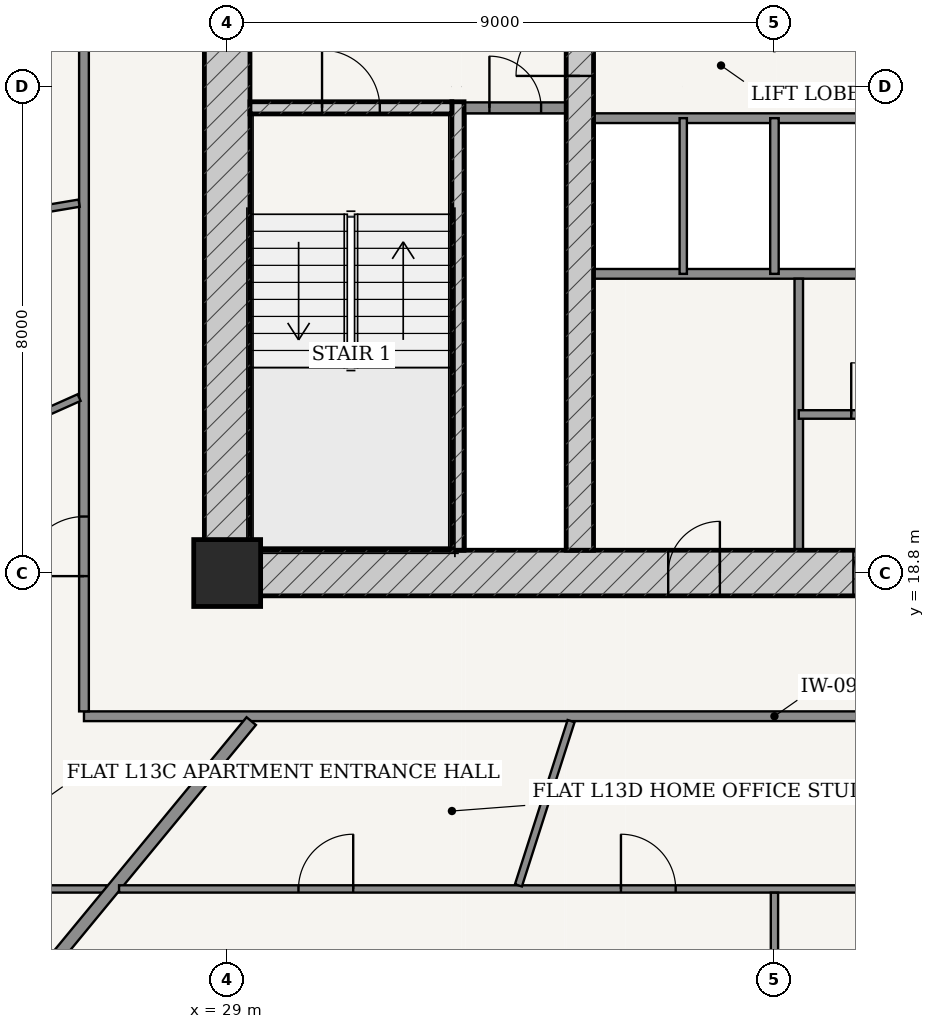
"""IFC4 building model, lengths in metres.
Left out: names, types, materials, properties, quantities, classifications, styles, units other than length and angle.
Written with IfcOpenShell. Run it as: python <this file> out.ifc"""

import sys

from ifc_helpers import new_model, si_unit, direction, frame, frame_2d, origin, origin_2d, place, context, subcontext, project, spatial, rectangle, extrude, source, transform, mapped, element, fill, save


model = new_model("IFC4")
c1 = context("Model", 3, precision=1e-05, world=origin(), true_north=direction((-0.2419218956, 0.970295726276)))
c2 = subcontext(c1, "Body", "Model", "MODEL_VIEW")
j1 = project(units=[si_unit("LENGTHUNIT", "METRE"), si_unit("PLANEANGLEUNIT", "RADIAN")], contexts=[c1])
p1 = place(None, origin())
s1 = spatial("IfcSite", under=j1, at=p1, CompositionType="ELEMENT")
p2 = place(p1, origin())
s2 = spatial("IfcBuilding", under=s1, at=p2, CompositionType="ELEMENT")
p3 = place(p2, frame((0.0, 0.0, 52.8)))
s3 = spatial("IfcBuildingStorey", under=s2, at=p3, CompositionType="ELEMENT", Elevation=52.8)
p4 = place(p3, frame((29.0, 18.8, 0.0), z_axis=(0.0, 0.0, 1.0), x_axis=(1.0, 0.0, 0.0)))
e1 = element("IfcColumn", 1, at=p4, inside=s3, PredefinedType="COLUMN", context=c2, shape_type="SweptSolid", body=[
    extrude(rectangle(XDim=1.1, YDim=1.1, at=origin_2d()), origin(), (0.0, 0.0, 1.0), 3.6),
])
p5 = place(p3, frame((28.625, 18.8, 0.0), z_axis=(0.0, 0.0, 1.0), x_axis=(1.0, 0.0, 0.0)))
e2 = element("IfcWall", 2, at=p5, inside=s3, PredefinedType="SHEAR", context=c2, shape_type="SweptSolid", body=[
    extrude(rectangle(XDim=18.75, YDim=0.75, at=frame_2d((9.375, 0.0))), origin(), (0.0, 0.0, 1.0), 3.32),
])
p6 = place(p5, frame((7.627, 0.0, 0.0)))
e3 = element("IfcOpeningElement", 3, at=p6, cuts=e2, PredefinedType="OPENING", context=c2, shape_type="SweptSolid", body=[
    extrude(rectangle(XDim=0.85, YDim=2.1, at=frame_2d((0.425, 1.05))), frame((0.0, 0.385, 0.0), z_axis=(0.0, -1.0, 0.0), x_axis=(1.0, 0.0, 0.0)), (0.0, 0.0, 1.0), 0.77),
])
p7 = place(p5, frame((10.673, 0.0, 0.0)))
e4 = element("IfcOpeningElement", 4, at=p7, cuts=e2, PredefinedType="OPENING", context=c2, shape_type="SweptSolid", body=[
    extrude(rectangle(XDim=0.85, YDim=2.1, at=frame_2d((0.425, 1.05))), frame((0.0, 0.385, 0.0), z_axis=(0.0, -1.0, 0.0), x_axis=(1.0, 0.0, 0.0)), (0.0, 0.0, 1.0), 0.77),
])
p8 = place(p3, frame((29.0, 19.175, 0.0), z_axis=(0.0, 0.0, 1.0), x_axis=(0.0, 1.0, 0.0)))
e5 = element("IfcWall", 5, at=p8, inside=s3, PredefinedType="SHEAR", context=c2, shape_type="SweptSolid", body=[
    extrude(rectangle(XDim=15.25, YDim=0.75, at=frame_2d((7.625, 0.0))), origin(), (0.0, 0.0, 1.0), 3.32),
])
p9 = place(p8, frame((9.875, 0.0, 0.0)))
e6 = element("IfcOpeningElement", 6, at=p9, cuts=e5, PredefinedType="OPENING", context=c2, shape_type="SweptSolid", body=[
    extrude(rectangle(XDim=1.5, YDim=2.2, at=frame_2d((0.75, 1.1))), frame((0.0, 0.385, 0.0), z_axis=(0.0, -1.0, 0.0), x_axis=(1.0, 0.0, 0.0)), (0.0, 0.0, 1.0), 0.77),
])
p10 = place(p3, frame((32.795, 19.175, 0.0), z_axis=(0.0, 0.0, 1.0), x_axis=(0.0, 1.0, 0.0)))
e7 = element("IfcWall", 7, at=p10, inside=s3, PredefinedType="SOLIDWALL", context=c2, shape_type="SweptSolid", body=[
    extrude(rectangle(XDim=7.375, YDim=0.2, at=frame_2d((3.688, 0.0))), origin(), (0.0, 0.0, 1.0), 3.32),
])
p11 = place(p3, frame((29.375, 26.45, 0.0), z_axis=(0.0, 0.0, 1.0), x_axis=(1.0, 0.0, 0.0)))
e8 = element("IfcWall", 8, at=p11, inside=s3, PredefinedType="SOLIDWALL", context=c2, shape_type="SweptSolid", body=[
    extrude(rectangle(XDim=3.32, YDim=0.2, at=frame_2d((1.66, 0.0))), origin(), (0.0, 0.0, 1.0), 3.32),
])
p12 = place(p11, frame((1.185, 0.0, 0.0)))
e9 = element("IfcOpeningElement", 9, at=p12, cuts=e8, PredefinedType="OPENING", context=c2, shape_type="SweptSolid", body=[
    extrude(rectangle(XDim=0.95, YDim=2.15, at=frame_2d((0.475, 1.075))), frame((0.0, 0.11, 0.0), z_axis=(0.0, -1.0, 0.0), x_axis=(1.0, 0.0, 0.0)), (0.0, 0.0, 1.0), 0.22),
])
p13 = place(p3, frame((34.8, 19.175, 0.0), z_axis=(0.0, 0.0, 1.0), x_axis=(0.0, 1.0, 0.0)))
e10 = element("IfcWall", 10, at=p13, inside=s3, PredefinedType="SHEAR", context=c2, shape_type="SweptSolid", body=[
    extrude(rectangle(XDim=15.25, YDim=0.45, at=frame_2d((7.625, 0.0))), origin(), (0.0, 0.0, 1.0), 3.32),
])
p14 = place(p13, frame((7.8, 0.0, 0.0)))
e11 = element("IfcOpeningElement", 11, at=p14, cuts=e10, PredefinedType="OPENING", context=c2, shape_type="SweptSolid", body=[
    extrude(rectangle(XDim=1.05, YDim=2.15, at=frame_2d((0.525, 1.075))), frame((0.0, 0.235, 0.0), z_axis=(0.0, -1.0, 0.0), x_axis=(1.0, 0.0, 0.0)), (0.0, 0.0, 1.0), 0.47),
])
p15 = place(p3, frame((32.9, 26.45, 0.0), z_axis=(0.0, 0.0, 1.0), x_axis=(1.0, 0.0, 0.0)))
e12 = element("IfcWall", 12, at=p15, inside=s3, PredefinedType="PARTITIONING", context=c2, shape_type="SweptSolid", body=[
    extrude(rectangle(XDim=1.675, YDim=0.18, at=frame_2d((0.837, 0.0))), origin(), (0.0, 0.0, 1.0), 3.32),
])
p16 = place(p15, frame((0.413, 0.0, 0.0)))
e13 = element("IfcOpeningElement", 13, at=p16, cuts=e12, PredefinedType="OPENING", context=c2, shape_type="SweptSolid", body=[
    extrude(rectangle(XDim=0.85, YDim=2.1, at=frame_2d((0.425, 1.05))), frame((0.0, 0.1, 0.0), z_axis=(0.0, -1.0, 0.0), x_axis=(1.0, 0.0, 0.0)), (0.0, 0.0, 1.0), 0.2),
])
for number, where, z_axis, x_axis in (
    (14, (35.025, 26.28, 0.0), (0.0, 0.0, 1.0), (1.0, 0.0, 0.0)),
    (15, (35.025, 23.72, 0.0), (0.0, 0.0, 1.0), (1.0, 0.0, 0.0)),
):
    element("IfcWall", number, at=place(p3, frame(where, z_axis=z_axis, x_axis=x_axis)), inside=s3, PredefinedType="PARTITIONING", context=c2, shape_type="SweptSolid", body=[
        extrude(rectangle(XDim=5.95, YDim=0.16, at=frame_2d((2.975, 0.0))), origin(), (0.0, 0.0, 1.0), 3.32),
    ])
p17 = place(p3, frame((36.5, 23.72, 0.0), z_axis=(0.0, 0.0, 1.0), x_axis=(0.0, 1.0, 0.0)))
e16 = element("IfcWall", 16, at=p17, inside=s3, PredefinedType="PARTITIONING", context=c2, shape_type="SweptSolid", body=[
    extrude(rectangle(XDim=2.56, YDim=0.12, at=frame_2d((1.28, 0.0))), origin(), (0.0, 0.0, 1.0), 3.32),
])
p18 = place(p3, frame((38.0, 23.72, 0.0), z_axis=(0.0, 0.0, 1.0), x_axis=(0.0, 1.0, 0.0)))
e17 = element("IfcWall", 17, at=p18, inside=s3, PredefinedType="PARTITIONING", context=c2, shape_type="SweptSolid", body=[
    extrude(rectangle(XDim=2.56, YDim=0.14, at=frame_2d((1.28, 0.0))), origin(), (0.0, 0.0, 1.0), 3.32),
])
p19 = place(p3, frame((38.4, 19.175, 0.0), z_axis=(0.0, 0.0, 1.0), x_axis=(0.0, 1.0, 0.0)))
e18 = element("IfcWall", 18, at=p19, inside=s3, PredefinedType="PARTITIONING", context=c2, shape_type="SweptSolid", body=[
    extrude(rectangle(XDim=4.465, YDim=0.14, at=frame_2d((2.232, 0.0))), origin(), (0.0, 0.0, 1.0), 3.32),
])
p20 = place(p3, frame((38.4, 21.407, 0.0), z_axis=(0.0, 0.0, 1.0), x_axis=(1.0, 0.0, 0.0)))
e19 = element("IfcWall", 19, at=p20, inside=s3, PredefinedType="PARTITIONING", context=c2, shape_type="SweptSolid", body=[
    extrude(rectangle(XDim=2.575, YDim=0.14, at=frame_2d((1.288, 0.0))), origin(), (0.0, 0.0, 1.0), 3.32),
])
p21 = place(p20, frame((0.863, 0.0, 0.0)))
e20 = element("IfcOpeningElement", 20, at=p21, cuts=e19, PredefinedType="OPENING", context=c2, shape_type="SweptSolid", body=[
    extrude(rectangle(XDim=0.85, YDim=2.1, at=frame_2d((0.425, 1.05))), frame((0.0, 0.08, 0.0), z_axis=(0.0, -1.0, 0.0), x_axis=(1.0, 0.0, 0.0)), (0.0, 0.0, 1.0), 0.16),
])
p22 = place(p3, frame((26.645, 16.445, 0.0), z_axis=(0.0, 0.0, 1.0), x_axis=(1.0, 0.0, 0.0)))
e21 = element("IfcWall", 21, at=p22, inside=s3, PredefinedType="PARTITIONING", context=c2, shape_type="SweptSolid", body=[
    extrude(rectangle(XDim=22.71, YDim=0.16, at=frame_2d((11.355, 0.0))), origin(), (0.0, 0.0, 1.0), 2.688),
])
p23 = place(p22, frame((19.962, 0.0, 0.0)))
e22 = element("IfcOpeningElement", 22, at=p23, cuts=e21, PredefinedType="OPENING", context=c2, shape_type="SweptSolid", body=[
    extrude(rectangle(XDim=0.98, YDim=2.2, at=frame_2d((0.49, 1.1))), frame((0.0, 0.09, 0.0), z_axis=(0.0, -1.0, 0.0), x_axis=(1.0, 0.0, 0.0)), (0.0, 0.0, 1.0), 0.18),
])
p24 = place(p3, frame((26.645, 16.525, 0.0), z_axis=(0.0, 0.0, 1.0), x_axis=(0.0, 1.0, 0.0)))
e23 = element("IfcWall", 23, at=p24, inside=s3, PredefinedType="PARTITIONING", context=c2, shape_type="SweptSolid", body=[
    extrude(rectangle(XDim=20.55, YDim=0.16, at=frame_2d((10.275, 0.0))), origin(), (0.0, 0.0, 1.0), 2.688),
])
p25 = place(p24, frame((2.224, 0.0, 0.0)))
e24 = element("IfcOpeningElement", 24, at=p25, cuts=e23, PredefinedType="OPENING", context=c2, shape_type="SweptSolid", body=[
    extrude(rectangle(XDim=0.98, YDim=2.2, at=frame_2d((0.49, 1.1))), frame((0.0, 0.09, 0.0), z_axis=(0.0, -1.0, 0.0), x_axis=(1.0, 0.0, 0.0)), (0.0, 0.0, 1.0), 0.18),
])
p26 = place(p3, frame((27.018, 13.605, 0.0), z_axis=(0.0, 0.0, 1.0), x_axis=(-1.0, 0.0, 0.0)))
e25 = element("IfcWall", 25, at=p26, inside=s3, PredefinedType="PARTITIONING", context=c2, shape_type="SweptSolid", body=[
    extrude(rectangle(XDim=3.213, YDim=0.12, at=frame_2d((1.606, 0.0))), origin(), (0.0, 0.0, 1.0), 2.688),
])
p27 = place(p3, frame((26.565, 24.883, 0.0), z_axis=(0.0, 0.0, 1.0), x_axis=(-0.986224611599, -0.165411654596, 0.0)))
e26 = element("IfcWall", 26, at=p27, inside=s3, PredefinedType="PARTITIONING", context=c2, shape_type="SweptSolid", body=[
    extrude(rectangle(XDim=2.736, YDim=0.12, at=frame_2d((1.368, 0.0))), origin(), (0.0, 0.0, 1.0), 2.688),
])
p28 = place(p3, frame((26.565, 21.685, 0.0), z_axis=(0.0, 0.0, 1.0), x_axis=(-0.912840085104, -0.408317252914, 0.0)))
e27 = element("IfcWall", 27, at=p28, inside=s3, PredefinedType="PARTITIONING", context=c2, shape_type="SweptSolid", body=[
    extrude(rectangle(XDim=2.961, YDim=0.12, at=frame_2d((1.481, 0.0))), origin(), (0.0, 0.0, 1.0), 3.32),
])
p29 = place(p28, frame((1.051, 0.0, 0.0)))
e28 = element("IfcOpeningElement", 28, at=p29, cuts=e27, PredefinedType="OPENING", context=c2, shape_type="SweptSolid", body=[
    extrude(rectangle(XDim=0.86, YDim=2.15, at=frame_2d((0.43, 1.075))), frame((0.0, 0.07, 0.0), z_axis=(0.0, -1.0, 0.0), x_axis=(1.0, 0.0, 0.0)), (0.0, 0.0, 1.0), 0.14),
])
p30 = place(p3, frame((29.396, 16.365, 0.0), z_axis=(0.0, 0.0, 1.0), x_axis=(-0.636186165667, -0.771535587393, 0.0)))
e29 = element("IfcWall", 29, at=p30, inside=s3, PredefinedType="PARTITIONING", context=c2, shape_type="SweptSolid", body=[
    extrude(rectangle(XDim=11.683, YDim=0.2, at=frame_2d((5.842, 0.0))), origin(), (0.0, 0.0, 1.0), 2.688),
])
p31 = place(p3, frame((52.195, 13.605, 0.0), z_axis=(0.0, 0.0, 1.0), x_axis=(-1.0, 0.0, 0.0)))
e30 = element("IfcWall", 30, at=p31, inside=s3, PredefinedType="PARTITIONING", context=c2, shape_type="SweptSolid", body=[
    extrude(rectangle(XDim=24.973, YDim=0.12, at=frame_2d((12.487, 0.0))), origin(), (0.0, 0.0, 1.0), 2.688),
])
p32 = place(p31, frame((3.841, 0.0, 0.0)))
e31 = element("IfcOpeningElement", 31, at=p32, cuts=e30, PredefinedType="OPENING", context=c2, shape_type="SweptSolid", body=[
    extrude(rectangle(XDim=0.9, YDim=2.15, at=frame_2d((0.45, 1.075))), frame((0.0, 0.07, 0.0), z_axis=(0.0, -1.0, 0.0), x_axis=(1.0, 0.0, 0.0)), (0.0, 0.0, 1.0), 0.14),
])
p33 = place(p31, frame((15.819, 0.0, 0.0)))
e32 = element("IfcOpeningElement", 32, at=p33, cuts=e30, PredefinedType="OPENING", context=c2, shape_type="SweptSolid", body=[
    extrude(rectangle(XDim=0.9, YDim=2.15, at=frame_2d((0.45, 1.075))), frame((0.0, 0.07, 0.0), z_axis=(0.0, -1.0, 0.0), x_axis=(1.0, 0.0, 0.0)), (0.0, 0.0, 1.0), 0.14),
])
p34 = place(p31, frame((21.123, 0.0, 0.0)))
e33 = element("IfcOpeningElement", 33, at=p34, cuts=e30, PredefinedType="OPENING", context=c2, shape_type="SweptSolid", body=[
    extrude(rectangle(XDim=0.9, YDim=2.15, at=frame_2d((0.45, 1.075))), frame((0.0, 0.07, 0.0), z_axis=(0.0, -1.0, 0.0), x_axis=(1.0, 0.0, 0.0)), (0.0, 0.0, 1.0), 0.14),
])
p35 = place(p3, frame((38.0, 13.543, 0.0), z_axis=(0.0, 0.0, 1.0), x_axis=(0.0, -1.0, 0.0)))
e34 = element("IfcWall", 34, at=p35, inside=s3, PredefinedType="PARTITIONING", context=c2, shape_type="SweptSolid", body=[
    extrude(rectangle(XDim=10.183, YDim=0.12, at=frame_2d((5.091, 0.0))), origin(), (0.0, 0.0, 1.0), 2.762),
])
p36 = place(p35, frame((4.642, 0.0, 0.0)))
e35 = element("IfcOpeningElement", 35, at=p36, cuts=e34, PredefinedType="OPENING", context=c2, shape_type="SweptSolid", body=[
    extrude(rectangle(XDim=0.9, YDim=2.15, at=frame_2d((0.45, 1.075))), frame((0.0, 0.07, 0.0), z_axis=(0.0, -1.0, 0.0), x_axis=(1.0, 0.0, 0.0)), (0.0, 0.0, 1.0), 0.14),
])
p37 = place(p3, frame((34.656, 16.365, 0.0), z_axis=(0.0, 0.0, 1.0), x_axis=(-0.305153630579, -0.952303135427, 0.0)))
e36 = element("IfcWall", 36, at=p37, inside=s3, PredefinedType="PARTITIONING", context=c2, shape_type="SweptSolid", body=[
    extrude(rectangle(XDim=2.836, YDim=0.12, at=frame_2d((1.418, 0.0))), origin(), (0.0, 0.0, 1.0), 3.32),
])
m1 = source(origin(), c2, "Body", "SweptSolid", [
    extrude(rectangle(XDim=1.05, YDim=2.15, at=frame_2d((0.525, 1.075))), frame((0.0, 0.025, 0.0), z_axis=(0.0, -1.0, 0.0), x_axis=(1.0, 0.0, 0.0)), (0.0, 0.0, 1.0), 0.05),
])
p38 = place(p14, origin())
e37 = element("IfcDoor", 37, at=p38, inside=s3, OperationType="SINGLE_SWING_LEFT", PredefinedType="DOOR", context=c2, shape_type="MappedRepresentation", body=[
    mapped(m1, transform((0.0, 0.0, 0.0), scale=1.0)),
])
fill(e11, e37)
m2 = source(origin(), c2, "Body", "SweptSolid", [
    extrude(rectangle(XDim=0.95, YDim=2.15, at=frame_2d((0.475, 1.075))), frame((0.0, 0.025, 0.0), z_axis=(0.0, -1.0, 0.0), x_axis=(1.0, 0.0, 0.0)), (0.0, 0.0, 1.0), 0.05),
])
p39 = place(p12, origin())
e38 = element("IfcDoor", 38, at=p39, inside=s3, OperationType="SINGLE_SWING_LEFT", PredefinedType="DOOR", context=c2, shape_type="MappedRepresentation", body=[
    mapped(m2, transform((0.0, 0.0, 0.0), scale=1.0)),
])
fill(e9, e38)
m3 = source(origin(), c2, "Body", "SweptSolid", [
    extrude(rectangle(XDim=0.85, YDim=2.1, at=frame_2d((0.425, 1.05))), frame((0.0, 0.025, 0.0), z_axis=(0.0, -1.0, 0.0), x_axis=(1.0, 0.0, 0.0)), (0.0, 0.0, 1.0), 0.05),
])
p40 = place(p16, origin())
e39 = element("IfcDoor", 39, at=p40, inside=s3, OperationType="SINGLE_SWING_LEFT", PredefinedType="DOOR", context=c2, shape_type="MappedRepresentation", body=[
    mapped(m3, transform((0.0, 0.0, 0.0), scale=1.0)),
])
fill(e13, e39)
p41 = place(p6, origin())
e40 = element("IfcDoor", 40, at=p41, inside=s3, OperationType="SINGLE_SWING_RIGHT", PredefinedType="DOOR", context=c2, shape_type="MappedRepresentation", body=[
    mapped(m3, transform((0.0, 0.0, 0.0), scale=1.0)),
])
fill(e3, e40)
p42 = place(p7, origin())
e41 = element("IfcDoor", 41, at=p42, inside=s3, OperationType="SINGLE_SWING_RIGHT", PredefinedType="DOOR", context=c2, shape_type="MappedRepresentation", body=[
    mapped(m3, transform((0.0, 0.0, 0.0), scale=1.0)),
])
fill(e4, e41)
p43 = place(p21, origin())
e42 = element("IfcDoor", 42, at=p43, inside=s3, OperationType="SINGLE_SWING_LEFT", PredefinedType="DOOR", context=c2, shape_type="MappedRepresentation", body=[
    mapped(m3, transform((0.0, 0.0, 0.0), scale=1.0)),
])
fill(e20, e42)
m4 = source(origin(), c2, "Body", "SweptSolid", [
    extrude(rectangle(XDim=0.98, YDim=2.2, at=frame_2d((0.49, 1.1))), frame((0.0, 0.025, 0.0), z_axis=(0.0, -1.0, 0.0), x_axis=(1.0, 0.0, 0.0)), (0.0, 0.0, 1.0), 0.05),
])
p44 = place(p25, origin())
e43 = element("IfcDoor", 43, at=p44, inside=s3, OperationType="SINGLE_SWING_LEFT", PredefinedType="DOOR", context=c2, shape_type="MappedRepresentation", body=[
    mapped(m4, transform((0.0, 0.0, 0.0), scale=1.0)),
])
fill(e24, e43)
m5 = source(origin(), c2, "Body", "SweptSolid", [
    extrude(rectangle(XDim=0.9, YDim=2.15, at=frame_2d((0.45, 1.075))), frame((0.0, 0.025, 0.0), z_axis=(0.0, -1.0, 0.0), x_axis=(1.0, 0.0, 0.0)), (0.0, 0.0, 1.0), 0.05),
])
p45 = place(p33, frame((0.9, 0.0, 0.0), z_axis=(0.0, 0.0, 1.0), x_axis=(-1.0, 0.0, 0.0)))
e44 = element("IfcDoor", 44, at=p45, inside=s3, OperationType="SINGLE_SWING_LEFT", PredefinedType="DOOR", context=c2, shape_type="MappedRepresentation", body=[
    mapped(m5, transform((0.0, 0.0, 0.0), scale=1.0)),
])
fill(e32, e44)
p46 = place(p34, frame((0.9, 0.0, 0.0), z_axis=(0.0, 0.0, 1.0), x_axis=(-1.0, 0.0, 0.0)))
e45 = element("IfcDoor", 45, at=p46, inside=s3, OperationType="SINGLE_SWING_RIGHT", PredefinedType="DOOR", context=c2, shape_type="MappedRepresentation", body=[
    mapped(m5, transform((0.0, 0.0, 0.0), scale=1.0)),
])
fill(e33, e45)
save(model, sys.argv[1])
